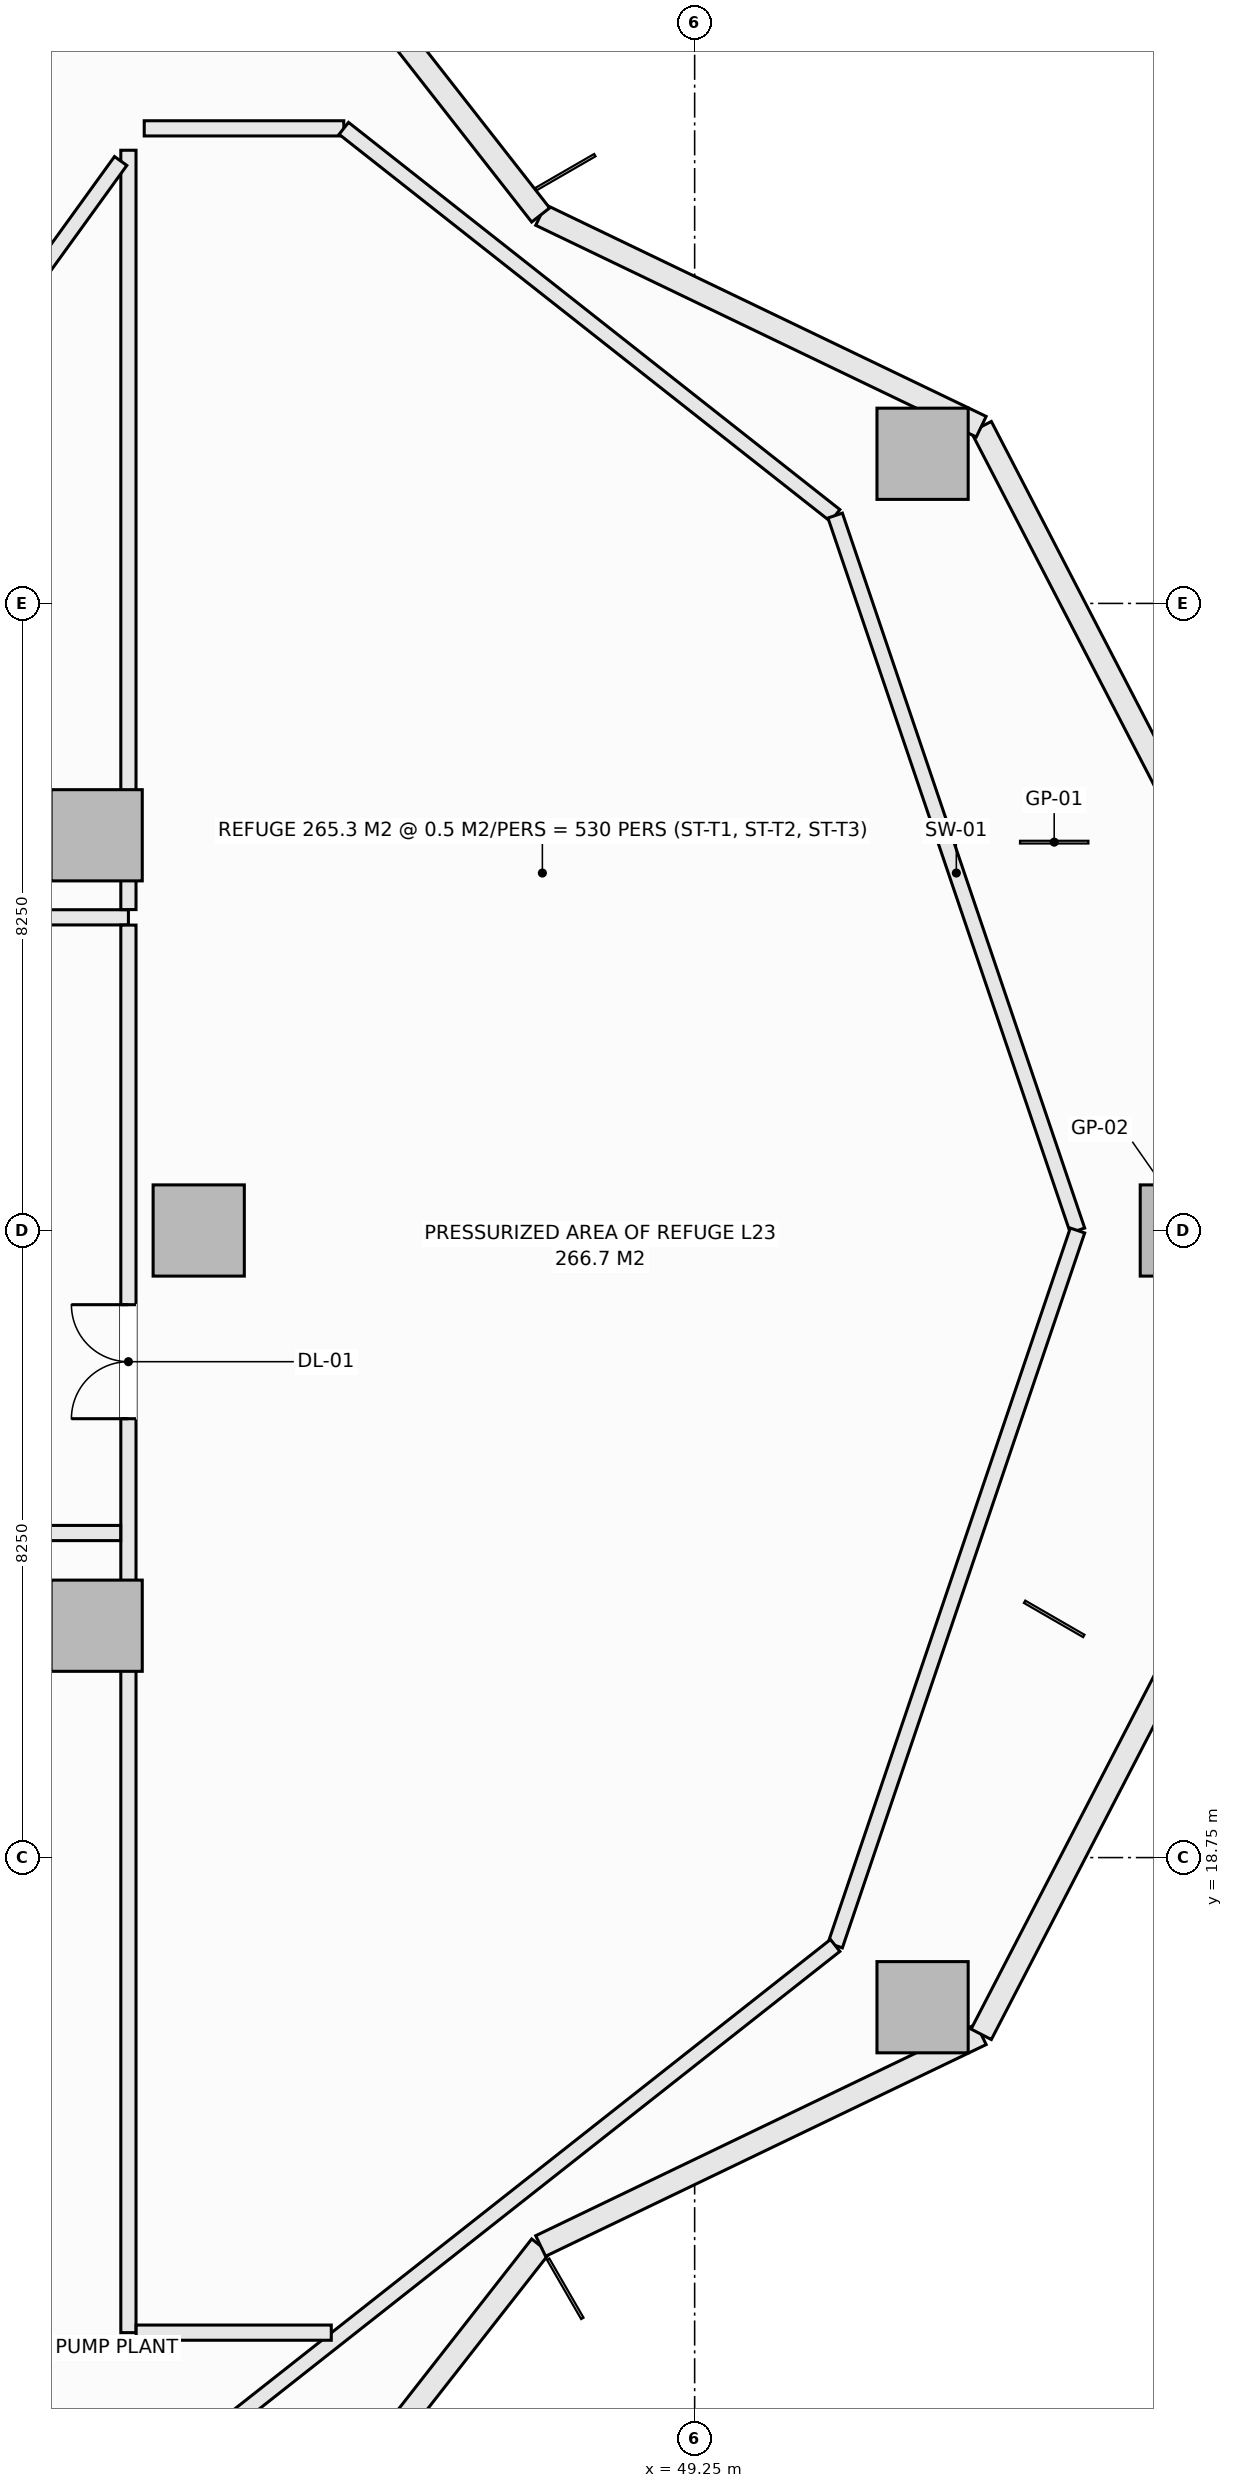
"""IFC4 building model, lengths in metres.
Left out: names, types, materials, properties, quantities, classifications, styles, units other than length and angle.
Written with IfcOpenShell. Run it as: python <this file> out.ifc"""

import sys

from ifc_helpers import new_model, si_unit, direction, frame, frame_2d, origin, origin_2d, place, context, subcontext, project, spatial, rectangle, extrude, element, fill, save


model = new_model("IFC4")
c1 = context("Model", 3, precision=1e-05, world=origin(), true_north=direction((0.0, 1.0)))
c2 = subcontext(c1, "Body", "Model", "MODEL_VIEW")
j1 = project(units=[si_unit("LENGTHUNIT", "METRE"), si_unit("PLANEANGLEUNIT", "RADIAN")], contexts=[c1])
p1 = place(None, origin())
s1 = spatial("IfcSite", under=j1, at=p1, CompositionType="ELEMENT")
p2 = place(p1, origin())
s2 = spatial("IfcBuilding", under=s1, at=p2, CompositionType="ELEMENT")
p3 = place(p2, frame((0.0, 0.0, 95.8)))
s3 = spatial("IfcBuildingStorey", under=s2, at=p3, CompositionType="ELEMENT", Elevation=95.8)
for number, where, z_axis, x_axis in (
    (1, (55.712, 27.0, -0.32), (0.0, 0.0, 1.0), (1.0, 0.0, 0.0)),
    (2, (52.249, 37.219, -0.32), (0.0, 0.0, 1.0), (1.0, 0.0, 0.0)),
    (3, (52.249, 16.781, -0.32), (0.0, 0.0, 1.0), (1.0, 0.0, 0.0)),
    (4, (42.725, 27.0, -0.32), (0.0, 0.0, 1.0), (1.0, 0.0, 0.0)),
    (5, (41.382, 32.199, -0.32), (0.0, 0.0, 1.0), (1.0, 0.0, 0.0)),
    (6, (41.382, 21.801, -0.32), (0.0, 0.0, 1.0), (1.0, 0.0, 0.0)),
):
    element("IfcColumn", number, at=place(p3, frame(where, z_axis=z_axis, x_axis=x_axis)), inside=s3, PredefinedType="COLUMN", context=c2, shape_type="SweptSolid", body=[
        extrude(rectangle(XDim=1.2, YDim=1.2, at=origin_2d()), origin(), (0.0, 0.0, 1.0), 5.04),
    ])
p4 = place(p3, frame((53.021, 37.575, 0.0), z_axis=(0.0, 0.0, 1.0), x_axis=(0.459800981414, -0.888021991558, 0.0)))
e7 = element("IfcWall", 7, at=p4, inside=s3, PredefinedType="SOLIDWALL", context=c2, shape_type="SweptSolid", body=[
    extrude(rectangle(XDim=5.744, YDim=0.3, at=frame_2d((2.872, 0.0))), origin(), (0.0, 0.0, 1.0), 1.15),
])
p5 = place(p3, frame((47.224, 40.36, 0.0), z_axis=(0.0, 0.0, 1.0), x_axis=(0.901354747727, -0.433081538224, 0.0)))
e8 = element("IfcWall", 8, at=p5, inside=s3, PredefinedType="SOLIDWALL", context=c2, shape_type="SweptSolid", body=[
    extrude(rectangle(XDim=6.431, YDim=0.3, at=frame_2d((3.215, 0.0))), origin(), (0.0, 0.0, 1.0), 1.15),
])
for number, where, z_axis, x_axis in (
    (9, (43.344, 45.316, 0.0), (0.0, 0.0, 1.0), (0.616, -0.787, 0.0)),
    (10, (43.344, 8.684, 0.0), (0.0, 0.0, 1.0), (0.616, 0.787, 0.0)),
):
    element("IfcWall", number, at=place(p3, frame(where, z_axis=z_axis, x_axis=x_axis)), inside=s3, PredefinedType="SOLIDWALL", context=c2, shape_type="SweptSolid", body=[
        extrude(rectangle(XDim=6.294, YDim=0.3, at=frame_2d((3.147, 0.0))), origin(), (0.0, 0.0, 1.0), 1.15),
    ])
p6 = place(p3, frame((47.224, 13.64, 0.0), z_axis=(0.0, 0.0, 1.0), x_axis=(0.901354747727, 0.433081538224, 0.0)))
e11 = element("IfcWall", 11, at=p6, inside=s3, PredefinedType="SOLIDWALL", context=c2, shape_type="SweptSolid", body=[
    extrude(rectangle(XDim=6.431, YDim=0.3, at=frame_2d((3.215, 0.0))), origin(), (0.0, 0.0, 1.0), 1.15),
])
p7 = place(p3, frame((53.021, 16.425, 0.0), z_axis=(0.0, 0.0, 1.0), x_axis=(0.459800981414, 0.888021991558, 0.0)))
e12 = element("IfcWall", 12, at=p7, inside=s3, PredefinedType="SOLIDWALL", context=c2, shape_type="SweptSolid", body=[
    extrude(rectangle(XDim=5.744, YDim=0.3, at=frame_2d((2.872, 0.0))), origin(), (0.0, 0.0, 1.0), 1.15),
])
p8 = place(p3, frame((39.02, 31.12, 0.0), z_axis=(0.0, 0.0, 1.0), x_axis=(1.0, 0.0, 0.0)))
e13 = element("IfcWall", 13, at=p8, inside=s3, PredefinedType="SOLIDWALL", context=c2, shape_type="SweptSolid", body=[
    extrude(rectangle(XDim=2.78, YDim=0.2, at=frame_2d((1.39, 0.0))), origin(), (0.0, 0.0, 1.0), 4.72),
])
p9 = place(p3, frame((41.8, 12.5, 0.0), z_axis=(0.0, 0.0, 1.0), x_axis=(0.0, 1.0, 0.0)))
e14 = element("IfcWall", 14, at=p9, inside=s3, PredefinedType="SOLIDWALL", context=c2, shape_type="SweptSolid", body=[
    extrude(rectangle(XDim=18.518, YDim=0.2, at=frame_2d((9.259, 0.0))), origin(), (0.0, 0.0, 1.0), 4.084),
])
p10 = place(p9, frame((12.024, 0.0, 0.0)))
e15 = element("IfcOpeningElement", 15, at=p10, cuts=e14, PredefinedType="OPENING", context=c2, shape_type="SweptSolid", body=[
    extrude(rectangle(XDim=1.5, YDim=2.2, at=frame_2d((0.75, 1.1))), frame((0.0, 0.11, 0.0), z_axis=(0.0, -1.0, 0.0), x_axis=(1.0, 0.0, 0.0)), (0.0, 0.0, 1.0), 0.22),
])
p11 = place(p3, frame((41.8, 31.222, 0.0), z_axis=(0.0, 0.0, 1.0), x_axis=(0.0, 1.0, 0.0)))
e16 = element("IfcWall", 16, at=p11, inside=s3, PredefinedType="SOLIDWALL", context=c2, shape_type="SweptSolid", body=[
    extrude(rectangle(XDim=9.99, YDim=0.2, at=frame_2d((4.995, 0.0))), origin(), (0.0, 0.0, 1.0), 4.084),
])
p12 = place(p3, frame((39.0, 23.02, 0.0), z_axis=(0.0, 0.0, 1.0), x_axis=(1.0, 0.0, 0.0)))
e17 = element("IfcWall", 17, at=p12, inside=s3, PredefinedType="SOLIDWALL", context=c2, shape_type="SweptSolid", body=[
    extrude(rectangle(XDim=2.698, YDim=0.2, at=frame_2d((1.349, 0.0))), origin(), (0.0, 0.0, 1.0), 4.72),
])
p13 = place(p3, frame((38.312, 36.383, 0.0), z_axis=(0.0, 0.0, 1.0), x_axis=(0.585479763009, 0.810687021672, 0.0)))
e18 = element("IfcWall", 18, at=p13, inside=s3, PredefinedType="SOLIDWALL", context=c2, shape_type="SweptSolid", body=[
    extrude(rectangle(XDim=5.782, YDim=0.2, at=frame_2d((2.891, 0.0))), origin(), (0.0, 0.0, 1.0), 4.72),
])
p14 = place(p3, frame((42.008, 41.5, 0.0), z_axis=(0.0, 0.0, 1.0), x_axis=(1.0, 0.0, 0.0)))
e19 = element("IfcWall", 19, at=p14, inside=s3, PredefinedType="SOLIDWALL", context=c2, shape_type="SweptSolid", body=[
    extrude(rectangle(XDim=2.626, YDim=0.2, at=frame_2d((1.313, 0.0))), origin(), (0.0, 0.0, 1.0), 4.72),
])
p15 = place(p3, frame((44.634, 41.5, 0.0), z_axis=(0.0, 0.0, 1.0), x_axis=(0.785474631089, -0.618893855129, 0.0)))
e20 = element("IfcWall", 20, at=p15, inside=s3, PredefinedType="SOLIDWALL", context=c2, shape_type="SweptSolid", body=[
    extrude(rectangle(XDim=8.231, YDim=0.2, at=frame_2d((4.115, 0.0))), origin(), (0.0, 0.0, 1.0), 4.72),
])
for number, where, z_axis, x_axis in (
    (21, (51.099, 36.406, 0.0), (0.0, 0.0, 1.0), (0.321, -0.947, 0.0)),
    (22, (51.099, 17.594, 0.0), (0.0, 0.0, 1.0), (0.321, 0.947, 0.0)),
):
    element("IfcWall", number, at=place(p3, frame(where, z_axis=z_axis, x_axis=x_axis)), inside=s3, PredefinedType="SOLIDWALL", context=c2, shape_type="SweptSolid", body=[
        extrude(rectangle(XDim=9.932, YDim=0.2, at=frame_2d((4.966, 0.0))), origin(), (0.0, 0.0, 1.0), 4.72),
    ])
p16 = place(p3, frame((42.259, 10.629, 0.0), z_axis=(0.0, 0.0, 1.0), x_axis=(0.78547601337, 0.618892100791, 0.0)))
e23 = element("IfcWall", 23, at=p16, inside=s3, PredefinedType="SOLIDWALL", context=c2, shape_type="SweptSolid", body=[
    extrude(rectangle(XDim=11.254, YDim=0.2, at=frame_2d((5.627, 0.0))), origin(), (0.0, 0.0, 1.0), 4.72),
])
p17 = place(p3, frame((41.902, 12.5, 0.0), z_axis=(0.0, 0.0, 1.0), x_axis=(1.0, 0.0, 0.0)))
e24 = element("IfcWall", 24, at=p17, inside=s3, PredefinedType="SOLIDWALL", context=c2, shape_type="SweptSolid", body=[
    extrude(rectangle(XDim=2.567, YDim=0.2, at=frame_2d((1.284, 0.0))), origin(), (0.0, 0.0, 1.0), 4.72),
])
p18 = place(p3, frame((36.45, 37.727, 0.0), z_axis=(0.0, 0.0, 1.0), x_axis=(0.585268596804, 0.810839484482, 0.0)))
e25 = element("IfcWall", 25, at=p18, inside=s3, PredefinedType="SOLIDWALL", context=c2, shape_type="SweptSolid", body=[
    extrude(rectangle(XDim=7.35, YDim=0.2, at=frame_2d((3.675, 0.0))), origin(), (0.0, 0.0, 1.0), 4.72),
])
p19 = place(p10, origin())
e26 = element("IfcDoor", 26, at=p19, inside=s3, OperationType="DOUBLE_DOOR_SINGLE_SWING", PredefinedType="DOOR", context=c2, shape_type="SweptSolid", body=[
    extrude(rectangle(XDim=1.5, YDim=2.2, at=frame_2d((0.75, 1.1))), frame((0.0, 0.025, 0.0), z_axis=(0.0, -1.0, 0.0), x_axis=(1.0, 0.0, 0.0)), (0.0, 0.0, 1.0), 0.05),
])
fill(e15, e26)
save(model, sys.argv[1])
